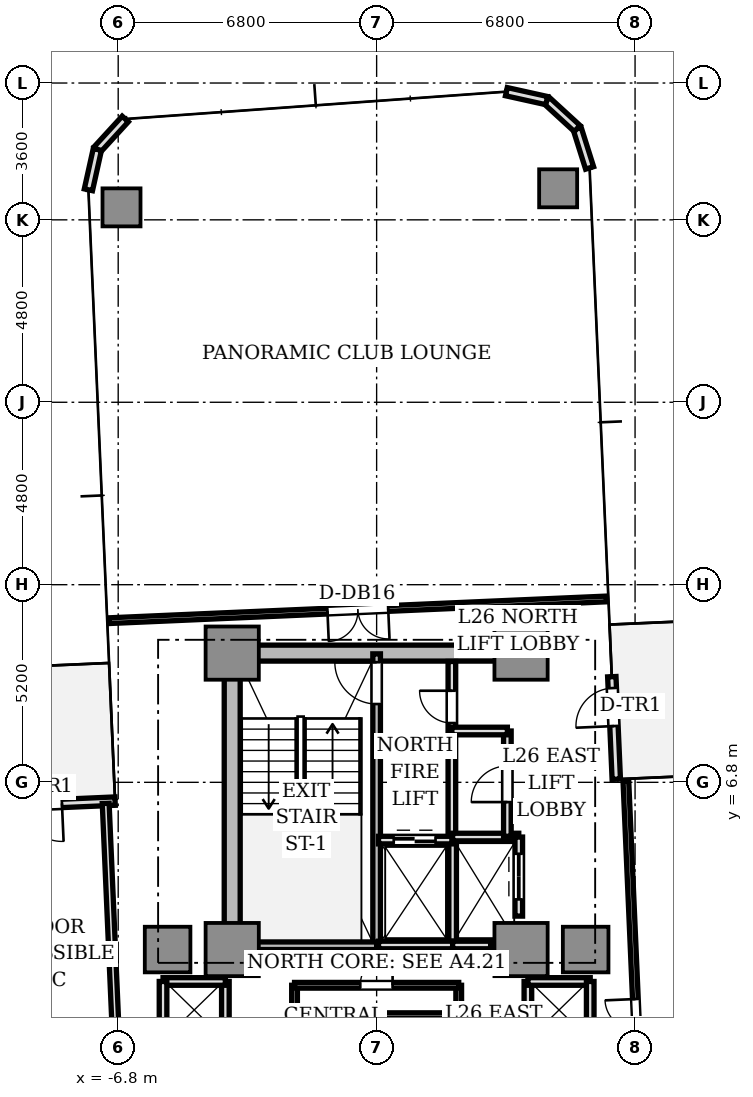
"""IFC4 building model, lengths in metres.
Left out: names, types, materials, properties, quantities, classifications, styles, units other than length and angle.
Written with IfcOpenShell. Run it as: python <this file> out.ifc"""

import sys

from ifc_helpers import new_model, si_unit, direction, frame, frame_2d, origin, origin_2d, place, context, subcontext, project, spatial, rectangle, extrude, source, transform, mapped, element, fill, save


model = new_model("IFC4")
c1 = context("Model", 3, precision=1e-05, world=origin(), true_north=direction((0.0, 1.0)))
c2 = subcontext(c1, "Body", "Model", "MODEL_VIEW")
j1 = project(units=[si_unit("LENGTHUNIT", "METRE"), si_unit("PLANEANGLEUNIT", "RADIAN")], contexts=[c1])
p1 = place(None, origin())
s1 = spatial("IfcSite", under=j1, at=p1, CompositionType="ELEMENT")
p2 = place(p1, origin())
s2 = spatial("IfcBuilding", under=s1, at=p2, CompositionType="ELEMENT")
p3 = place(p2, frame((0.0, 0.0, 96.9)))
s3 = spatial("IfcBuildingStorey", under=s2, at=p3, CompositionType="ELEMENT", Elevation=96.9)
p4 = place(p3, frame((-3.55, 10.2, 0.0), z_axis=(0.0, 0.0, 1.0), x_axis=(1.0, 0.0, 0.0)))
e1 = element("IfcWall", 1, at=p4, inside=s3, PredefinedType="SHEAR", context=c2, shape_type="SweptSolid", body=[
    extrude(rectangle(XDim=7.1, YDim=0.42, at=frame_2d((3.55, 0.0))), origin(), (0.0, 0.0, 1.0), 3.11),
])
p5 = place(p3, frame((-3.8, 2.85, 0.0), z_axis=(0.0, 0.0, 1.0), x_axis=(0.0, 1.0, 0.0)))
e2 = element("IfcWall", 2, at=p5, inside=s3, PredefinedType="SHEAR", context=c2, shape_type="SweptSolid", body=[
    extrude(rectangle(XDim=6.9, YDim=0.42, at=frame_2d((3.45, 0.0))), origin(), (0.0, 0.0, 1.0), 3.11),
])
m1 = source(origin(), c2, "Body", "SweptSolid", [
    extrude(rectangle(XDim=1.4, YDim=1.4, at=origin_2d()), origin(), (0.0, 0.0, 1.0), 3.11),
])
for number, where, z_axis, x_axis in (
    (3, (-3.8, 2.4, 0.0), (0.0, 0.0, 1.0), (1.0, 0.0, 0.0)),
    (4, (3.8, 2.4, 0.0), (0.0, 0.0, 1.0), (1.0, 0.0, 0.0)),
    (5, (-3.8, 10.2, 0.0), (0.0, 0.0, 1.0), (1.0, 0.0, 0.0)),
    (6, (3.8, 10.2, 0.0), (0.0, 0.0, 1.0), (1.0, 0.0, 0.0)),
):
    element("IfcColumn", number, at=place(p3, frame(where, z_axis=z_axis, x_axis=x_axis)), inside=s3, PredefinedType="COLUMN", context=c2, shape_type="MappedRepresentation", body=[
        mapped(m1, transform((0.0, 0.0, 0.0), scale=1.0)),
    ])
m2 = source(origin(), c2, "Body", "SweptSolid", [
    extrude(rectangle(XDim=1.2, YDim=1.2, at=origin_2d()), origin(), (0.0, 0.0, 1.0), 3.11),
])
for number, where, z_axis, x_axis in (
    (7, (5.5, 2.4, 0.0), (0.0, 0.0, 1.0), (1.0, 0.0, 0.0)),
    (8, (-5.5, 2.4, 0.0), (0.0, 0.0, 1.0), (1.0, 0.0, 0.0)),
):
    element("IfcColumn", number, at=place(p3, frame(where, z_axis=z_axis, x_axis=x_axis)), inside=s3, PredefinedType="COLUMN", context=c2, shape_type="MappedRepresentation", body=[
        mapped(m2, transform((0.0, 0.0, 0.0), scale=1.0)),
    ])
m3 = source(origin(), c2, "Body", "SweptSolid", [
    extrude(rectangle(XDim=1.0, YDim=1.0, at=origin_2d()), origin(), (0.0, 0.0, 1.0), 3.11),
])
for number, where, z_axis, x_axis in (
    (9, (4.776, 22.43, 0.0), (0.0, 0.0, 1.0), (1.0, 0.0, 0.0)),
    (10, (-6.713, 21.928, 0.0), (0.0, 0.0, 1.0), (1.0, 0.0, 0.0)),
):
    element("IfcColumn", number, at=place(p3, frame(where, z_axis=z_axis, x_axis=x_axis)), inside=s3, PredefinedType="COLUMN", context=c2, shape_type="MappedRepresentation", body=[
        mapped(m3, transform((0.0, 0.0, 0.0), scale=1.0)),
    ])
p6 = place(p3, frame((6.306, 6.882, 0.0), z_axis=(0.0, 0.0, 1.0), x_axis=(-0.043672655174, 0.999045894436, 0.0)))
e11 = element("IfcWall", 11, at=p6, inside=s3, PredefinedType="STANDARD", context=c2, shape_type="SweptSolid", body=[
    extrude(rectangle(XDim=2.7, YDim=0.22, at=frame_2d((1.35, 0.0))), origin(), (0.0, 0.0, 1.0), 3.11),
])
p7 = place(p6, frame((1.4, 0.0, 0.0)))
e12 = element("IfcOpeningElement", 12, at=p7, cuts=e11, PredefinedType="OPENING", context=c2, shape_type="SweptSolid", body=[
    extrude(rectangle(XDim=1.0, YDim=2.2, at=frame_2d((0.5, 1.1))), frame((0.0, 0.12, 0.0), z_axis=(0.0, -1.0, 0.0), x_axis=(1.0, 0.0, 0.0)), (0.0, 0.0, 1.0), 0.24),
])
p8 = place(p3, frame((5.604, 22.966, 0.0), z_axis=(0.0, 0.0, 1.0), x_axis=(-0.300755105707, 0.953701403161, 0.0)))
e13 = element("IfcWall", 13, at=p8, inside=s3, PredefinedType="STANDARD", context=c2, shape_type="SweptSolid", body=[
    extrude(rectangle(XDim=1.087, YDim=0.22, at=frame_2d((0.543, 0.0))), origin(), (0.0, 0.0, 1.0), 3.11),
])
p9 = place(p3, frame((5.277, 24.003, 0.0), z_axis=(0.0, 0.0, 1.0), x_axis=(-0.737312600672, 0.675551721847, 0.0)))
e14 = element("IfcWall", 14, at=p9, inside=s3, PredefinedType="STANDARD", context=c2, shape_type="SweptSolid", body=[
    extrude(rectangle(XDim=1.087, YDim=0.22, at=frame_2d((0.543, 0.0))), origin(), (0.0, 0.0, 1.0), 3.11),
])
for number, where, z_axis, x_axis in (
    (15, (4.475, 24.737, 0.0), (0.0, 0.0, 1.0), (-0.976, 0.217, 0.0)),
    (16, (-6.614, 24.253, 0.0), (0.0, 0.0, 1.0), (-0.676, -0.737, 0.0)),
):
    element("IfcWall", number, at=place(p3, frame(where, z_axis=z_axis, x_axis=x_axis)), inside=s3, PredefinedType="STANDARD", context=c2, shape_type="SweptSolid", body=[
        extrude(rectangle(XDim=1.087, YDim=0.22, at=frame_2d((0.543, 0.0))), origin(), (0.0, 0.0, 1.0), 3.11),
    ])
p10 = place(p3, frame((-7.349, 23.452, 0.0), z_axis=(0.0, 0.0, 1.0), x_axis=(-0.216454939174, -0.976292609471, 0.0)))
e17 = element("IfcWall", 17, at=p10, inside=s3, PredefinedType="STANDARD", context=c2, shape_type="SweptSolid", body=[
    extrude(rectangle(XDim=1.087, YDim=0.22, at=frame_2d((0.544, 0.0))), origin(), (0.0, 0.0, 1.0), 3.11),
])
p11 = place(p3, frame((-6.882, 6.306, 0.0), z_axis=(0.0, 0.0, 1.0), x_axis=(-0.999045894436, -0.043672655174, 0.0)))
e18 = element("IfcWall", 18, at=p11, inside=s3, PredefinedType="STANDARD", context=c2, shape_type="SweptSolid", body=[
    extrude(rectangle(XDim=2.7, YDim=0.22, at=frame_2d((1.35, 0.0))), origin(), (0.0, 0.0, 1.0), 3.11),
])
p12 = place(p11, frame((1.4, 0.0, 0.0)))
e19 = element("IfcOpeningElement", 19, at=p12, cuts=e18, PredefinedType="OPENING", context=c2, shape_type="SweptSolid", body=[
    extrude(rectangle(XDim=1.0, YDim=2.2, at=frame_2d((0.5, 1.1))), frame((0.0, 0.12, 0.0), z_axis=(0.0, -1.0, 0.0), x_axis=(1.0, 0.0, 0.0)), (0.0, 0.0, 1.0), 0.24),
])
p13 = place(p3, frame((0.0, 2.5, 0.0), z_axis=(0.0, 0.0, 1.0), x_axis=(0.0, 1.0, 0.0)))
e20 = element("IfcWall", 20, at=p13, inside=s3, PredefinedType="SOLIDWALL", context=c2, shape_type="SweptSolid", body=[
    extrude(rectangle(XDim=7.68, YDim=0.2, at=frame_2d((3.84, 0.0))), origin(), (0.0, 0.0, 1.0), 3.11),
])
p14 = place(p13, frame((6.36, 0.0, 0.0)))
e21 = element("IfcOpeningElement", 21, at=p14, cuts=e20, PredefinedType="OPENING", context=c2, shape_type="SweptSolid", body=[
    extrude(rectangle(XDim=1.1, YDim=2.15, at=frame_2d((0.55, 1.075))), frame((0.0, 0.11, 0.0), z_axis=(0.0, -1.0, 0.0), x_axis=(1.0, 0.0, 0.0)), (0.0, 0.0, 1.0), 0.22),
])
p15 = place(p3, frame((-3.72, 2.5, 0.0), z_axis=(0.0, 0.0, 1.0), x_axis=(1.0, 0.0, 0.0)))
e22 = element("IfcWall", 22, at=p15, inside=s3, PredefinedType="SOLIDWALL", context=c2, shape_type="SweptSolid", body=[
    extrude(rectangle(XDim=3.72, YDim=0.2, at=frame_2d((1.86, 0.0))), origin(), (0.0, 0.0, 1.0), 3.11),
])
p16 = place(p3, frame((1.98, 5.32, 0.0), z_axis=(0.0, 0.0, 1.0), x_axis=(0.0, 1.0, 0.0)))
e23 = element("IfcWall", 23, at=p16, inside=s3, PredefinedType="SOLIDWALL", context=c2, shape_type="SweptSolid", body=[
    extrude(rectangle(XDim=4.66, YDim=0.2, at=frame_2d((2.33, 0.0))), origin(), (0.0, 0.0, 1.0), 2.66),
])
p17 = place(p16, frame((3.04, 0.0, 0.0)))
e24 = element("IfcOpeningElement", 24, at=p17, cuts=e23, PredefinedType="OPENING", context=c2, shape_type="SweptSolid", body=[
    extrude(rectangle(XDim=0.85, YDim=2.1, at=frame_2d((0.425, 1.05))), frame((0.0, 0.11, 0.0), z_axis=(0.0, -1.0, 0.0), x_axis=(1.0, 0.0, 0.0)), (0.0, 0.0, 1.0), 0.22),
])
p18 = place(p3, frame((2.0, 2.5, 0.0), z_axis=(0.0, 0.0, 1.0), x_axis=(0.0, 1.0, 0.0)))
e25 = element("IfcWall", 25, at=p18, inside=s3, PredefinedType="SOLIDWALL", context=c2, shape_type="SweptSolid", body=[
    extrude(rectangle(XDim=2.78, YDim=0.2, at=frame_2d((1.39, 0.0))), origin(), (0.0, 0.0, 1.0), 2.66),
])
p19 = place(p3, frame((0.05, 2.52, 0.0), z_axis=(0.0, 0.0, 1.0), x_axis=(1.0, 0.0, 0.0)))
e26 = element("IfcWall", 26, at=p19, inside=s3, PredefinedType="SOLIDWALL", context=c2, shape_type="SweptSolid", body=[
    extrude(rectangle(XDim=1.95, YDim=0.2, at=frame_2d((0.975, 0.0))), origin(), (0.0, 0.0, 1.0), 2.66),
])
p20 = place(p3, frame((0.05, 5.28, 0.0), z_axis=(0.0, 0.0, 1.0), x_axis=(1.0, 0.0, 0.0)))
e27 = element("IfcWall", 27, at=p20, inside=s3, PredefinedType="SOLIDWALL", context=c2, shape_type="SweptSolid", body=[
    extrude(rectangle(XDim=1.93, YDim=0.2, at=frame_2d((0.965, 0.0))), origin(), (0.0, 0.0, 1.0), 2.66),
])
p21 = place(p20, frame((0.4, 0.0, 0.0)))
e28 = element("IfcOpeningElement", 28, at=p21, cuts=e27, PredefinedType="OPENING", context=c2, shape_type="SweptSolid", body=[
    extrude(rectangle(XDim=1.1, YDim=2.2, at=frame_2d((0.55, 1.1))), frame((0.0, 0.11, 0.0), z_axis=(0.0, -1.0, 0.0), x_axis=(1.0, 0.0, 0.0)), (0.0, 0.0, 1.0), 0.22),
])
p22 = place(p3, frame((2.0, 2.52, 0.0), z_axis=(0.0, 0.0, 1.0), x_axis=(1.0, 0.0, 0.0)))
e29 = element("IfcWall", 29, at=p22, inside=s3, PredefinedType="SOLIDWALL", context=c2, shape_type="SweptSolid", body=[
    extrude(rectangle(XDim=1.0, YDim=0.2, at=frame_2d((0.5, 0.0))), origin(), (0.0, 0.0, 1.0), 2.66),
])
p23 = place(p3, frame((2.0, 5.36, 0.0), z_axis=(0.0, 0.0, 1.0), x_axis=(1.0, 0.0, 0.0)))
e30 = element("IfcWall", 30, at=p23, inside=s3, PredefinedType="SOLIDWALL", context=c2, shape_type="SweptSolid", body=[
    extrude(rectangle(XDim=1.74, YDim=0.2, at=frame_2d((0.87, 0.0))), origin(), (0.0, 0.0, 1.0), 2.66),
])
p24 = place(p3, frame((3.74, 3.28, 0.0), z_axis=(0.0, 0.0, 1.0), x_axis=(0.0, 1.0, 0.0)))
e31 = element("IfcWall", 31, at=p24, inside=s3, PredefinedType="SOLIDWALL", context=c2, shape_type="SweptSolid", body=[
    extrude(rectangle(XDim=2.08, YDim=0.2, at=frame_2d((1.04, 0.0))), origin(), (0.0, 0.0, 1.0), 2.66),
])
p25 = place(p24, frame((0.44, 0.0, 0.0)))
e32 = element("IfcOpeningElement", 32, at=p25, cuts=e31, PredefinedType="OPENING", context=c2, shape_type="SweptSolid", body=[
    extrude(rectangle(XDim=1.2, YDim=2.2, at=frame_2d((0.6, 1.1))), frame((0.0, 0.11, 0.0), z_axis=(0.0, -1.0, 0.0), x_axis=(1.0, 0.0, 0.0)), (0.0, 0.0, 1.0), 0.22),
])
p26 = place(p3, frame((3.98, -1.56, 0.0), z_axis=(0.0, 0.0, 1.0), x_axis=(0.0, 1.0, 0.0)))
e33 = element("IfcWall", 33, at=p26, inside=s3, PredefinedType="SOLIDWALL", context=c2, shape_type="SweptSolid", body=[
    extrude(rectangle(XDim=3.12, YDim=0.2, at=frame_2d((1.56, 0.0))), origin(), (0.0, 0.0, 1.0), 2.28),
])
p27 = place(p3, frame((3.98, 1.56, 0.0), z_axis=(0.0, 0.0, 1.0), x_axis=(1.0, 0.0, 0.0)))
e34 = element("IfcWall", 34, at=p27, inside=s3, PredefinedType="SOLIDWALL", context=c2, shape_type="SweptSolid", body=[
    extrude(rectangle(XDim=1.64, YDim=0.2, at=frame_2d((0.82, 0.0))), origin(), (0.0, 0.0, 1.0), 2.66),
])
p28 = place(p3, frame((5.62, 0.0, 0.0), z_axis=(0.0, 0.0, 1.0), x_axis=(0.0, 1.0, 0.0)))
e35 = element("IfcWall", 35, at=p28, inside=s3, PredefinedType="SOLIDWALL", context=c2, shape_type="SweptSolid", body=[
    extrude(rectangle(XDim=1.56, YDim=0.2, at=frame_2d((0.78, 0.0))), origin(), (0.0, 0.0, 1.0), 2.66),
])
p29 = place(p3, frame((-3.98, -1.56, 0.0), z_axis=(0.0, 0.0, 1.0), x_axis=(0.0, 1.0, 0.0)))
e36 = element("IfcWall", 36, at=p29, inside=s3, PredefinedType="SOLIDWALL", context=c2, shape_type="SweptSolid", body=[
    extrude(rectangle(XDim=3.12, YDim=0.2, at=frame_2d((1.56, 0.0))), origin(), (0.0, 0.0, 1.0), 2.28),
])
p30 = place(p3, frame((-5.62, 1.56, 0.0), z_axis=(0.0, 0.0, 1.0), x_axis=(1.0, 0.0, 0.0)))
e37 = element("IfcWall", 37, at=p30, inside=s3, PredefinedType="SOLIDWALL", context=c2, shape_type="SweptSolid", body=[
    extrude(rectangle(XDim=1.64, YDim=0.2, at=frame_2d((0.82, 0.0))), origin(), (0.0, 0.0, 1.0), 2.66),
])
p31 = place(p3, frame((-5.62, 0.0, 0.0), z_axis=(0.0, 0.0, 1.0), x_axis=(0.0, 1.0, 0.0)))
e38 = element("IfcWall", 38, at=p31, inside=s3, PredefinedType="SOLIDWALL", context=c2, shape_type="SweptSolid", body=[
    extrude(rectangle(XDim=1.56, YDim=0.2, at=frame_2d((0.78, 0.0))), origin(), (0.0, 0.0, 1.0), 2.66),
])
p32 = place(p3, frame((3.44, 5.38, 0.0), z_axis=(0.0, 0.0, 1.0), x_axis=(0.0, 1.0, 0.0)))
e39 = element("IfcWall", 39, at=p32, inside=s3, PredefinedType="SOLIDWALL", context=c2, shape_type="SweptSolid", body=[
    extrude(rectangle(XDim=2.77, YDim=0.2, at=frame_2d((1.385, 0.0))), origin(), (0.0, 0.0, 1.0), 2.66),
])
p33 = place(p32, frame((0.9, 0.0, 0.0)))
e40 = element("IfcOpeningElement", 40, at=p33, cuts=e39, PredefinedType="OPENING", context=c2, shape_type="SweptSolid", body=[
    extrude(rectangle(XDim=0.95, YDim=2.15, at=frame_2d((0.475, 1.075))), frame((0.0, 0.11, 0.0), z_axis=(0.0, -1.0, 0.0), x_axis=(1.0, 0.0, 0.0)), (0.0, 0.0, 1.0), 0.22),
])
p34 = place(p3, frame((1.98, 8.15, 0.0), z_axis=(0.0, 0.0, 1.0), x_axis=(1.0, 0.0, 0.0)))
e41 = element("IfcWall", 41, at=p34, inside=s3, PredefinedType="SOLIDWALL", context=c2, shape_type="SweptSolid", body=[
    extrude(rectangle(XDim=1.46, YDim=0.2, at=frame_2d((0.73, 0.0))), origin(), (0.0, 0.0, 1.0), 2.66),
])
p35 = place(p3, frame((2.16, -1.46, 0.0), z_axis=(0.0, 0.0, 1.0), x_axis=(0.0, 1.0, 0.0)))
e42 = element("IfcWall", 42, at=p35, inside=s3, PredefinedType="PARTITIONING", context=c2, shape_type="SweptSolid", body=[
    extrude(rectangle(XDim=2.92, YDim=0.15, at=frame_2d((1.46, 0.0))), origin(), (0.0, 0.0, 1.0), 2.66),
])
p36 = place(p35, frame((1.035, 0.0, 0.0)))
e43 = element("IfcOpeningElement", 43, at=p36, cuts=e42, PredefinedType="OPENING", context=c2, shape_type="SweptSolid", body=[
    extrude(rectangle(XDim=0.85, YDim=2.1, at=frame_2d((0.425, 1.05))), frame((0.0, 0.085, 0.0), z_axis=(0.0, -1.0, 0.0), x_axis=(1.0, 0.0, 0.0)), (0.0, 0.0, 1.0), 0.17),
])
p37 = place(p3, frame((-2.16, -1.46, 0.0), z_axis=(0.0, 0.0, 1.0), x_axis=(0.0, 1.0, 0.0)))
e44 = element("IfcWall", 44, at=p37, inside=s3, PredefinedType="PARTITIONING", context=c2, shape_type="SweptSolid", body=[
    extrude(rectangle(XDim=2.92, YDim=0.15, at=frame_2d((1.46, 0.0))), origin(), (0.0, 0.0, 1.0), 2.66),
])
p38 = place(p3, frame((-2.16, 1.46, 0.0), z_axis=(0.0, 0.0, 1.0), x_axis=(1.0, 0.0, 0.0)))
e45 = element("IfcWall", 45, at=p38, inside=s3, PredefinedType="PARTITIONING", context=c2, shape_type="SweptSolid", body=[
    extrude(rectangle(XDim=4.32, YDim=0.15, at=frame_2d((2.16, 0.0))), origin(), (0.0, 0.0, 1.0), 2.66),
])
p39 = place(p38, frame((1.73, 0.0, 0.0)))
e46 = element("IfcOpeningElement", 46, at=p39, cuts=e45, PredefinedType="OPENING", context=c2, shape_type="SweptSolid", body=[
    extrude(rectangle(XDim=0.85, YDim=2.1, at=frame_2d((0.425, 1.05))), frame((0.0, 0.085, 0.0), z_axis=(0.0, -1.0, 0.0), x_axis=(1.0, 0.0, 0.0)), (0.0, 0.0, 1.0), 0.17),
])
p40 = place(p3, frame((-2.16, 0.66, 0.0), z_axis=(0.0, 0.0, 1.0), x_axis=(1.0, 0.0, 0.0)))
e47 = element("IfcWall", 47, at=p40, inside=s3, PredefinedType="PARTITIONING", context=c2, shape_type="SweptSolid", body=[
    extrude(rectangle(XDim=4.32, YDim=0.15, at=frame_2d((2.16, 0.0))), origin(), (0.0, 0.0, 1.0), 2.66),
])
p41 = place(p3, frame((7.129, -6.245, 0.0), z_axis=(0.0, 0.0, 1.0), x_axis=(-0.043609488494, 0.999048653727, 0.0)))
e48 = element("IfcWall", 48, at=p41, inside=s3, PredefinedType="PARTITIONING", context=c2, shape_type="SweptSolid", body=[
    extrude(rectangle(XDim=13.1, YDim=0.15, at=frame_2d((6.55, 0.0))), origin(), (0.0, 0.0, 1.0), 2.66),
])
p42 = place(p41, frame((5.75, 0.0, 0.0)))
e49 = element("IfcOpeningElement", 49, at=p42, cuts=e48, PredefinedType="OPENING", context=c2, shape_type="SweptSolid", body=[
    extrude(rectangle(XDim=1.6, YDim=2.25, at=frame_2d((0.8, 1.125))), frame((0.0, 0.085, 0.0), z_axis=(0.0, -1.0, 0.0), x_axis=(1.0, 0.0, 0.0)), (0.0, 0.0, 1.0), 0.17),
])
p43 = place(p3, frame((6.049, 11.625, 0.0), z_axis=(0.0, 0.0, 1.0), x_axis=(-0.999047806124, -0.043628901879, 0.0)))
e50 = element("IfcWall", 50, at=p43, inside=s3, PredefinedType="PARTITIONING", context=c2, shape_type="SweptSolid", body=[
    extrude(rectangle(XDim=13.1, YDim=0.15, at=frame_2d((6.55, 0.0))), origin(), (0.0, 0.0, 1.0), 2.66),
])
p44 = place(p43, frame((5.75, 0.0, 0.0)))
e51 = element("IfcOpeningElement", 51, at=p44, cuts=e50, PredefinedType="OPENING", context=c2, shape_type="SweptSolid", body=[
    extrude(rectangle(XDim=1.6, YDim=2.25, at=frame_2d((0.8, 1.125))), frame((0.0, 0.085, 0.0), z_axis=(0.0, -1.0, 0.0), x_axis=(1.0, 0.0, 0.0)), (0.0, 0.0, 1.0), 0.17),
])
p45 = place(p3, frame((-7.129, 6.245, 0.0), z_axis=(0.0, 0.0, 1.0), x_axis=(0.043600217373, -0.999049058378, 0.0)))
e52 = element("IfcWall", 52, at=p45, inside=s3, PredefinedType="PARTITIONING", context=c2, shape_type="SweptSolid", body=[
    extrude(rectangle(XDim=7.8, YDim=0.18, at=frame_2d((3.9, 0.0))), origin(), (0.0, 0.0, 1.0), 2.66),
])
m4 = source(origin(), c2, "Body", "SweptSolid", [
    extrude(rectangle(XDim=1.0, YDim=0.05, at=origin_2d()), origin(), (0.0, 0.0, 1.0), 2.2),
])
p46 = place(p7, frame((0.5, 0.0, 0.0)))
e53 = element("IfcDoor", 53, at=p46, inside=s3, OperationType="SINGLE_SWING_LEFT", PredefinedType="DOOR", context=c2, shape_type="MappedRepresentation", body=[
    mapped(m4, transform((0.0, 0.0, 0.0), scale=1.0)),
])
fill(e12, e53)
p47 = place(p12, frame((0.5, 0.0, 0.0)))
e54 = element("IfcDoor", 54, at=p47, inside=s3, OperationType="SINGLE_SWING_LEFT", PredefinedType="DOOR", context=c2, shape_type="MappedRepresentation", body=[
    mapped(m4, transform((0.0, 0.0, 0.0), scale=1.0)),
])
fill(e19, e54)
m5 = source(origin(), c2, "Body", "SweptSolid", [
    extrude(rectangle(XDim=1.1, YDim=0.05, at=origin_2d()), origin(), (0.0, 0.0, 1.0), 2.15),
])
p48 = place(p14, frame((0.55, 0.0, 0.0)))
e55 = element("IfcDoor", 55, at=p48, inside=s3, OperationType="SINGLE_SWING_RIGHT", PredefinedType="DOOR", context=c2, shape_type="MappedRepresentation", body=[
    mapped(m5, transform((0.0, 0.0, 0.0), scale=1.0)),
])
fill(e21, e55)
m6 = source(origin(), c2, "Body", "SweptSolid", [
    extrude(rectangle(XDim=0.85, YDim=0.05, at=origin_2d()), origin(), (0.0, 0.0, 1.0), 2.1),
])
p49 = place(p17, frame((0.425, 0.0, 0.0)))
e56 = element("IfcDoor", 56, at=p49, inside=s3, OperationType="SINGLE_SWING_RIGHT", PredefinedType="DOOR", context=c2, shape_type="MappedRepresentation", body=[
    mapped(m6, transform((0.0, 0.0, 0.0), scale=1.0)),
])
fill(e24, e56)
m7 = source(origin(), c2, "Body", "SweptSolid", [
    extrude(rectangle(XDim=1.1, YDim=0.05, at=origin_2d()), origin(), (0.0, 0.0, 1.0), 2.2),
])
p50 = place(p21, frame((0.55, 0.0, 0.0)))
e57 = element("IfcDoor", 57, at=p50, inside=s3, OperationType="DOUBLE_DOOR_SLIDING", PredefinedType="DOOR", context=c2, shape_type="MappedRepresentation", body=[
    mapped(m7, transform((0.0, 0.0, 0.0), scale=1.0)),
])
fill(e28, e57)
m8 = source(origin(), c2, "Body", "SweptSolid", [
    extrude(rectangle(XDim=1.2, YDim=0.05, at=origin_2d()), origin(), (0.0, 0.0, 1.0), 2.2),
])
p51 = place(p25, frame((0.6, 0.0, 0.0)))
e58 = element("IfcDoor", 58, at=p51, inside=s3, OperationType="DOUBLE_DOOR_SLIDING", PredefinedType="DOOR", context=c2, shape_type="MappedRepresentation", body=[
    mapped(m8, transform((0.0, 0.0, 0.0), scale=1.0)),
])
fill(e32, e58)
m9 = source(origin(), c2, "Body", "SweptSolid", [
    extrude(rectangle(XDim=0.95, YDim=0.05, at=origin_2d()), origin(), (0.0, 0.0, 1.0), 2.15),
])
p52 = place(p33, frame((0.475, 0.0, 0.0)))
e59 = element("IfcDoor", 59, at=p52, inside=s3, OperationType="SINGLE_SWING_LEFT", PredefinedType="DOOR", context=c2, shape_type="MappedRepresentation", body=[
    mapped(m9, transform((0.0, 0.0, 0.0), scale=1.0)),
])
fill(e40, e59)
p53 = place(p39, frame((0.425, 0.0, 0.0)))
e60 = element("IfcDoor", 60, at=p53, inside=s3, OperationType="SINGLE_SWING_RIGHT", PredefinedType="DOOR", context=c2, shape_type="MappedRepresentation", body=[
    mapped(m6, transform((0.0, 0.0, 0.0), scale=1.0)),
])
fill(e46, e60)
m10 = source(origin(), c2, "Body", "SweptSolid", [
    extrude(rectangle(XDim=1.6, YDim=0.05, at=origin_2d()), origin(), (0.0, 0.0, 1.0), 2.25),
])
p54 = place(p42, frame((0.8, 0.0, 0.0)))
e61 = element("IfcDoor", 61, at=p54, inside=s3, OperationType="DOUBLE_DOOR_SINGLE_SWING", PredefinedType="DOOR", context=c2, shape_type="MappedRepresentation", body=[
    mapped(m10, transform((0.0, 0.0, 0.0), scale=1.0)),
])
fill(e49, e61)
p55 = place(p44, frame((0.8, 0.0, 0.0)))
e62 = element("IfcDoor", 62, at=p55, inside=s3, OperationType="DOUBLE_DOOR_SINGLE_SWING", PredefinedType="DOOR", context=c2, shape_type="MappedRepresentation", body=[
    mapped(m10, transform((0.0, 0.0, 0.0), scale=1.0)),
])
fill(e51, e62)
save(model, sys.argv[1])
